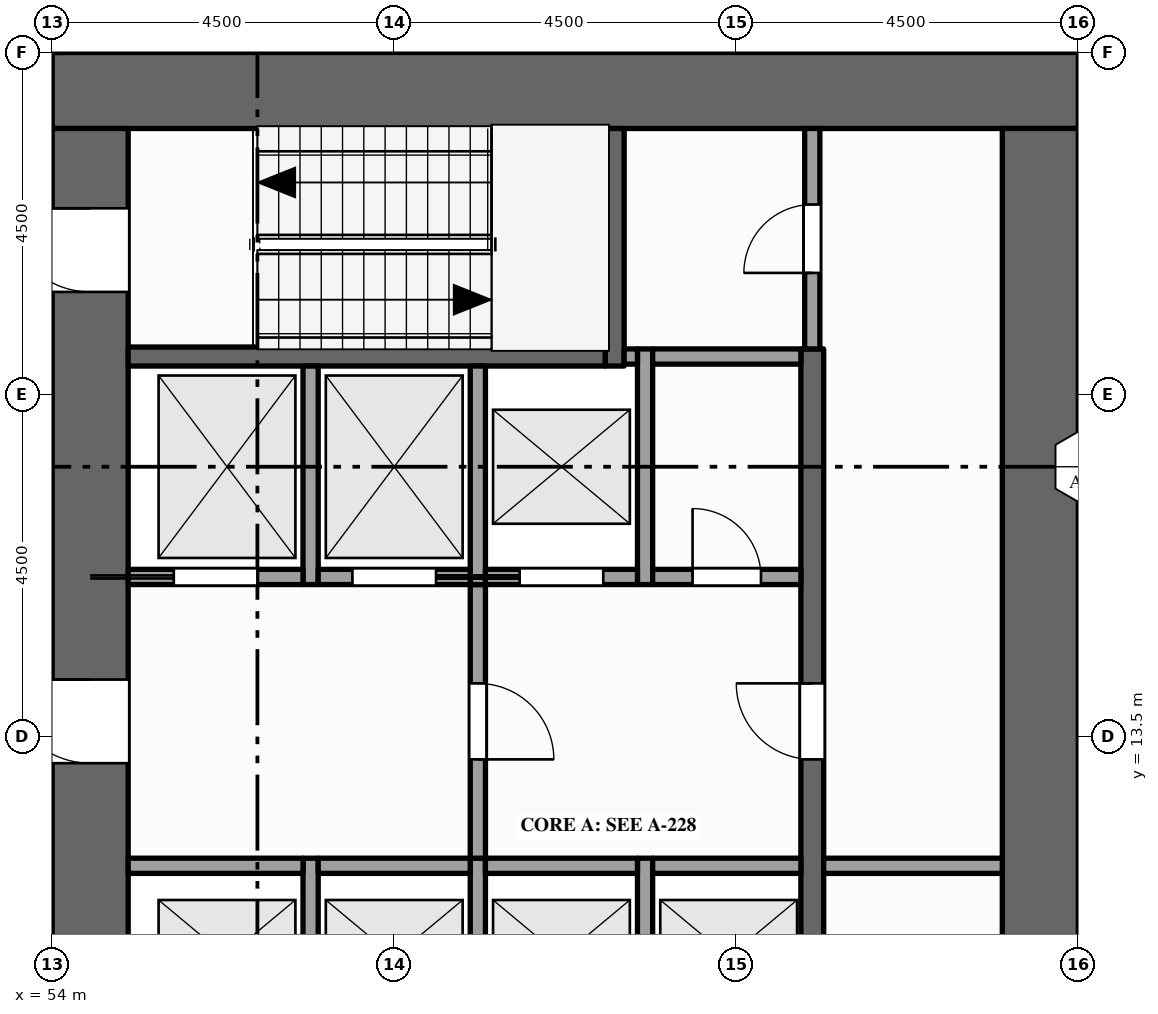
"""IFC4 building model, lengths in metres.
Left out: names, types, materials, properties, quantities, classifications, styles, units other than length and angle.
Written with IfcOpenShell. Run it as: python <this file> out.ifc"""

import sys

from ifc_helpers import new_model, si_unit, direction, frame, frame_2d, origin, place, context, subcontext, project, spatial, rectangle, extrude, element, fill, save


model = new_model("IFC4")
c1 = context("Model", 3, precision=1e-05, world=origin(), true_north=direction((0.0, 1.0)))
c2 = subcontext(c1, "Body", "Model", "MODEL_VIEW")
j1 = project(units=[si_unit("LENGTHUNIT", "METRE"), si_unit("PLANEANGLEUNIT", "RADIAN")], contexts=[c1])
p1 = place(None, origin())
s1 = spatial("IfcSite", under=j1, at=p1, CompositionType="ELEMENT")
p2 = place(p1, origin())
s2 = spatial("IfcBuilding", under=s1, at=p2, CompositionType="ELEMENT")
p3 = place(p2, frame((0.0, 0.0, 151.0)))
s3 = spatial("IfcBuildingStorey", under=s2, at=p3, CompositionType="ELEMENT", Elevation=151.0)
p4 = place(p3, frame((54.0, 22.0, -0.15), z_axis=(0.0, 0.0, 1.0), x_axis=(1.0, 0.0, 0.0)))
e1 = element("IfcWall", 1, at=p4, inside=s3, PredefinedType="SHEAR", context=c2, shape_type="SweptSolid", body=[
    extrude(rectangle(XDim=13.5, YDim=1.0, at=frame_2d((6.75, 0.0))), origin(), (0.0, 0.0, 1.0), 4.0),
])
p5 = place(p3, frame((54.5, 1.0, -0.15), z_axis=(0.0, 0.0, 1.0), x_axis=(0.0, 1.0, 0.0)))
e2 = element("IfcWall", 2, at=p5, inside=s3, PredefinedType="SHEAR", context=c2, shape_type="SweptSolid", body=[
    extrude(rectangle(XDim=20.5, YDim=1.0, at=frame_2d((10.25, 0.0))), origin(), (0.0, 0.0, 1.0), 4.0),
])
p6 = place(p5, frame((6.1, 0.0, 0.15)))
e3 = element("IfcOpeningElement", 3, at=p6, cuts=e2, PredefinedType="OPENING", context=c2, shape_type="SweptSolid", body=[
    extrude(rectangle(XDim=1.8, YDim=2.1, at=frame_2d((0.9, 1.05))), frame((0.0, 0.51, 0.0), z_axis=(0.0, -1.0, 0.0), x_axis=(1.0, 0.0, 0.0)), (0.0, 0.0, 1.0), 1.02),
])
p7 = place(p5, frame((12.15, 0.0, 0.15)))
e4 = element("IfcOpeningElement", 4, at=p7, cuts=e2, PredefinedType="OPENING", context=c2, shape_type="SweptSolid", body=[
    extrude(rectangle(XDim=1.1, YDim=2.1, at=frame_2d((0.55, 1.05))), frame((0.0, 0.51, 0.0), z_axis=(0.0, -1.0, 0.0), x_axis=(1.0, 0.0, 0.0)), (0.0, 0.0, 1.0), 1.02),
])
p8 = place(p5, frame((1.15, 0.0, 0.15)))
e5 = element("IfcOpeningElement", 5, at=p8, cuts=e2, PredefinedType="OPENING", context=c2, shape_type="SweptSolid", body=[
    extrude(rectangle(XDim=1.1, YDim=2.1, at=frame_2d((0.55, 1.05))), frame((0.0, 0.51, 0.0), z_axis=(0.0, -1.0, 0.0), x_axis=(1.0, 0.0, 0.0)), (0.0, 0.0, 1.0), 1.02),
])
p9 = place(p5, frame((18.35, 0.0, 0.15)))
e6 = element("IfcOpeningElement", 6, at=p9, cuts=e2, PredefinedType="OPENING", context=c2, shape_type="SweptSolid", body=[
    extrude(rectangle(XDim=1.1, YDim=2.1, at=frame_2d((0.55, 1.05))), frame((0.0, 0.51, 0.0), z_axis=(0.0, -1.0, 0.0), x_axis=(1.0, 0.0, 0.0)), (0.0, 0.0, 1.0), 1.02),
])
p10 = place(p3, frame((67.0, 1.0, -0.15), z_axis=(0.0, 0.0, 1.0), x_axis=(0.0, 1.0, 0.0)))
e7 = element("IfcWall", 7, at=p10, inside=s3, PredefinedType="SHEAR", context=c2, shape_type="SweptSolid", body=[
    extrude(rectangle(XDim=20.5, YDim=1.0, at=frame_2d((10.25, 0.0))), origin(), (0.0, 0.0, 1.0), 4.0),
])
p11 = place(p3, frame((54.0, 22.5, 0.0), z_axis=(0.0, 0.0, 1.0), x_axis=(0.0, 1.0, 0.0)))
e8 = element("IfcWall", 8, at=p11, inside=s3, PredefinedType="STANDARD", context=c2, shape_type="SweptSolid", body=[
    extrude(rectangle(XDim=1.05, YDim=0.3, at=frame_2d((0.525, 0.0))), origin(), (0.0, 0.0, 1.0), 3.149),
])
p12 = place(p3, frame((57.4, 9.3, 0.0), z_axis=(0.0, 0.0, 1.0), x_axis=(0.0, 1.0, 0.0)))
e9 = element("IfcWall", 9, at=p12, inside=s3, PredefinedType="SOLIDWALL", context=c2, shape_type="SweptSolid", body=[
    extrude(rectangle(XDim=2.6, YDim=0.2, at=frame_2d((1.3, 0.0))), origin(), (0.0, 0.0, 1.0), 3.85),
])
p13 = place(p3, frame((57.4, 15.5, 0.0), z_axis=(0.0, 0.0, 1.0), x_axis=(0.0, 1.0, 0.0)))
e10 = element("IfcWall", 10, at=p13, inside=s3, PredefinedType="SOLIDWALL", context=c2, shape_type="SweptSolid", body=[
    extrude(rectangle(XDim=2.875, YDim=0.2, at=frame_2d((1.438, 0.0))), origin(), (0.0, 0.0, 1.0), 3.85),
])
p14 = place(p3, frame((59.6, 9.3, 0.0), z_axis=(0.0, 0.0, 1.0), x_axis=(0.0, 1.0, 0.0)))
e11 = element("IfcWall", 11, at=p14, inside=s3, PredefinedType="SOLIDWALL", context=c2, shape_type="SweptSolid", body=[
    extrude(rectangle(XDim=2.6, YDim=0.2, at=frame_2d((1.3, 0.0))), origin(), (0.0, 0.0, 1.0), 3.85),
])
p15 = place(p3, frame((59.6, 11.9, 0.0), z_axis=(0.0, 0.0, 1.0), x_axis=(0.0, 1.0, 0.0)))
e12 = element("IfcWall", 12, at=p15, inside=s3, PredefinedType="PARTITIONING", context=c2, shape_type="SweptSolid", body=[
    extrude(rectangle(XDim=3.6, YDim=0.2, at=frame_2d((1.8, 0.0))), origin(), (0.0, 0.0, 1.0), 3.85),
])
p16 = place(p15, frame((1.3, 0.0, 0.0)))
e13 = element("IfcOpeningElement", 13, at=p16, cuts=e12, PredefinedType="OPENING", context=c2, shape_type="SweptSolid", body=[
    extrude(rectangle(XDim=1.0, YDim=2.1, at=frame_2d((0.5, 1.05))), frame((0.0, 0.11, 0.0), z_axis=(0.0, -1.0, 0.0), x_axis=(1.0, 0.0, 0.0)), (0.0, 0.0, 1.0), 0.22),
])
p17 = place(p3, frame((59.6, 15.5, 0.0), z_axis=(0.0, 0.0, 1.0), x_axis=(0.0, 1.0, 0.0)))
e14 = element("IfcWall", 14, at=p17, inside=s3, PredefinedType="SOLIDWALL", context=c2, shape_type="SweptSolid", body=[
    extrude(rectangle(XDim=2.875, YDim=0.2, at=frame_2d((1.438, 0.0))), origin(), (0.0, 0.0, 1.0), 3.85),
])
p18 = place(p3, frame((61.4, 18.375, 0.0), z_axis=(0.0, 0.0, 1.0), x_axis=(0.0, 1.0, 0.0)))
e15 = element("IfcWall", 15, at=p18, inside=s3, PredefinedType="SHEAR", context=c2, shape_type="SweptSolid", body=[
    extrude(rectangle(XDim=3.125, YDim=0.25, at=frame_2d((1.562, 0.0))), origin(), (0.0, 0.0, 1.0), 3.85),
])
p19 = place(p3, frame((61.8, 9.3, 0.0), z_axis=(0.0, 0.0, 1.0), x_axis=(0.0, 1.0, 0.0)))
e16 = element("IfcWall", 16, at=p19, inside=s3, PredefinedType="SOLIDWALL", context=c2, shape_type="SweptSolid", body=[
    extrude(rectangle(XDim=2.6, YDim=0.2, at=frame_2d((1.3, 0.0))), origin(), (0.0, 0.0, 1.0), 3.85),
])
p20 = place(p3, frame((61.8, 15.5, 0.0), z_axis=(0.0, 0.0, 1.0), x_axis=(0.0, 1.0, 0.0)))
e17 = element("IfcWall", 17, at=p20, inside=s3, PredefinedType="SOLIDWALL", context=c2, shape_type="SweptSolid", body=[
    extrude(rectangle(XDim=3.1, YDim=0.2, at=frame_2d((1.55, 0.0))), origin(), (0.0, 0.0, 1.0), 3.85),
])
p21 = place(p3, frame((64.0, 4.1, 0.0), z_axis=(0.0, 0.0, 1.0), x_axis=(0.0, 1.0, 0.0)))
e18 = element("IfcWall", 18, at=p21, inside=s3, PredefinedType="SHEAR", context=c2, shape_type="SweptSolid", body=[
    extrude(rectangle(XDim=14.5, YDim=0.3, at=frame_2d((7.25, 0.0))), origin(), (0.0, 0.0, 1.0), 3.85),
])
p22 = place(p21, frame((3.4, 0.0, 0.0)))
e19 = element("IfcOpeningElement", 19, at=p22, cuts=e18, PredefinedType="OPENING", context=c2, shape_type="SweptSolid", body=[
    extrude(rectangle(XDim=1.0, YDim=2.1, at=frame_2d((0.5, 1.05))), frame((0.0, 0.16, 0.0), z_axis=(0.0, -1.0, 0.0), x_axis=(1.0, 0.0, 0.0)), (0.0, 0.0, 1.0), 0.32),
])
p23 = place(p21, frame((9.1, 0.0, 0.0)))
e20 = element("IfcOpeningElement", 20, at=p23, cuts=e18, PredefinedType="OPENING", context=c2, shape_type="SweptSolid", body=[
    extrude(rectangle(XDim=1.0, YDim=2.1, at=frame_2d((0.5, 1.05))), frame((0.0, 0.16, 0.0), z_axis=(0.0, -1.0, 0.0), x_axis=(1.0, 0.0, 0.0)), (0.0, 0.0, 1.0), 0.32),
])
p24 = place(p3, frame((64.0, 18.6, 0.0), z_axis=(0.0, 0.0, 1.0), x_axis=(0.0, 1.0, 0.0)))
e21 = element("IfcWall", 21, at=p24, inside=s3, PredefinedType="PARTITIONING", context=c2, shape_type="SweptSolid", body=[
    extrude(rectangle(XDim=2.9, YDim=0.2, at=frame_2d((1.45, 0.0))), origin(), (0.0, 0.0, 1.0), 3.85),
])
p25 = place(p24, frame((1.0, 0.0, 0.0)))
e22 = element("IfcOpeningElement", 22, at=p25, cuts=e21, PredefinedType="OPENING", context=c2, shape_type="SweptSolid", body=[
    extrude(rectangle(XDim=0.9, YDim=2.1, at=frame_2d((0.45, 1.05))), frame((0.0, 0.11, 0.0), z_axis=(0.0, -1.0, 0.0), x_axis=(1.0, 0.0, 0.0)), (0.0, 0.0, 1.0), 0.22),
])
p26 = place(p3, frame((55.0, 11.8, 0.0), z_axis=(0.0, 0.0, 1.0), x_axis=(1.0, 0.0, 0.0)))
e23 = element("IfcWall", 23, at=p26, inside=s3, PredefinedType="SOLIDWALL", context=c2, shape_type="SweptSolid", body=[
    extrude(rectangle(XDim=2.3, YDim=0.2, at=frame_2d((1.15, 0.0))), origin(), (0.0, 0.0, 1.0), 3.85),
])
for number, where, z_axis, x_axis in (
    (24, (57.5, 11.8, 0.0), (0.0, 0.0, 1.0), (1.0, 0.0, 0.0)),
    (25, (59.7, 11.8, 0.0), (0.0, 0.0, 1.0), (1.0, 0.0, 0.0)),
):
    element("IfcWall", number, at=place(p3, frame(where, z_axis=z_axis, x_axis=x_axis)), inside=s3, PredefinedType="SOLIDWALL", context=c2, shape_type="SweptSolid", body=[
        extrude(rectangle(XDim=2.0, YDim=0.2, at=frame_2d((1.0, 0.0))), origin(), (0.0, 0.0, 1.0), 3.85),
    ])
p27 = place(p3, frame((61.9, 11.8, 0.0), z_axis=(0.0, 0.0, 1.0), x_axis=(1.0, 0.0, 0.0)))
e26 = element("IfcWall", 26, at=p27, inside=s3, PredefinedType="SOLIDWALL", context=c2, shape_type="SweptSolid", body=[
    extrude(rectangle(XDim=1.95, YDim=0.2, at=frame_2d((0.975, 0.0))), origin(), (0.0, 0.0, 1.0), 3.85),
])
p28 = place(p3, frame((64.15, 11.8, 0.0), z_axis=(0.0, 0.0, 1.0), x_axis=(1.0, 0.0, 0.0)))
e27 = element("IfcWall", 27, at=p28, inside=s3, PredefinedType="PARTITIONING", context=c2, shape_type="SweptSolid", body=[
    extrude(rectangle(XDim=2.35, YDim=0.2, at=frame_2d((1.175, 0.0))), origin(), (0.0, 0.0, 1.0), 3.85),
])
p29 = place(p3, frame((55.0, 15.6, 0.0), z_axis=(0.0, 0.0, 1.0), x_axis=(1.0, 0.0, 0.0)))
e28 = element("IfcWall", 28, at=p29, inside=s3, PredefinedType="SOLIDWALL", context=c2, shape_type="SweptSolid", body=[
    extrude(rectangle(XDim=2.3, YDim=0.2, at=frame_2d((1.15, 0.0))), origin(), (0.0, 0.0, 1.0), 3.85),
])
p30 = place(p29, frame((0.6, 0.0, 0.012)))
e29 = element("IfcOpeningElement", 29, at=p30, cuts=e28, PredefinedType="OPENING", context=c2, shape_type="SweptSolid", body=[
    extrude(rectangle(XDim=1.1, YDim=2.1, at=frame_2d((0.55, 1.05))), frame((0.0, 0.11, 0.0), z_axis=(0.0, -1.0, 0.0), x_axis=(1.0, 0.0, 0.0)), (0.0, 0.0, 1.0), 0.22),
])
p31 = place(p3, frame((57.5, 15.6, 0.0), z_axis=(0.0, 0.0, 1.0), x_axis=(1.0, 0.0, 0.0)))
e30 = element("IfcWall", 30, at=p31, inside=s3, PredefinedType="SOLIDWALL", context=c2, shape_type="SweptSolid", body=[
    extrude(rectangle(XDim=2.0, YDim=0.2, at=frame_2d((1.0, 0.0))), origin(), (0.0, 0.0, 1.0), 3.85),
])
p32 = place(p31, frame((0.45, 0.0, 0.012)))
e31 = element("IfcOpeningElement", 31, at=p32, cuts=e30, PredefinedType="OPENING", context=c2, shape_type="SweptSolid", body=[
    extrude(rectangle(XDim=1.1, YDim=2.1, at=frame_2d((0.55, 1.05))), frame((0.0, 0.11, 0.0), z_axis=(0.0, -1.0, 0.0), x_axis=(1.0, 0.0, 0.0)), (0.0, 0.0, 1.0), 0.22),
])
p33 = place(p3, frame((59.7, 15.6, 0.0), z_axis=(0.0, 0.0, 1.0), x_axis=(1.0, 0.0, 0.0)))
e32 = element("IfcWall", 32, at=p33, inside=s3, PredefinedType="SOLIDWALL", context=c2, shape_type="SweptSolid", body=[
    extrude(rectangle(XDim=2.0, YDim=0.2, at=frame_2d((1.0, 0.0))), origin(), (0.0, 0.0, 1.0), 3.85),
])
p34 = place(p33, frame((0.45, 0.0, 0.012)))
e33 = element("IfcOpeningElement", 33, at=p34, cuts=e32, PredefinedType="OPENING", context=c2, shape_type="SweptSolid", body=[
    extrude(rectangle(XDim=1.1, YDim=2.1, at=frame_2d((0.55, 1.05))), frame((0.0, 0.11, 0.0), z_axis=(0.0, -1.0, 0.0), x_axis=(1.0, 0.0, 0.0)), (0.0, 0.0, 1.0), 0.22),
])
p35 = place(p3, frame((61.9, 15.6, 0.0), z_axis=(0.0, 0.0, 1.0), x_axis=(1.0, 0.0, 0.0)))
e34 = element("IfcWall", 34, at=p35, inside=s3, PredefinedType="PARTITIONING", context=c2, shape_type="SweptSolid", body=[
    extrude(rectangle(XDim=1.95, YDim=0.2, at=frame_2d((0.975, 0.0))), origin(), (0.0, 0.0, 1.0), 3.85),
])
p36 = place(p35, frame((0.525, 0.0, 0.0)))
e35 = element("IfcOpeningElement", 35, at=p36, cuts=e34, PredefinedType="OPENING", context=c2, shape_type="SweptSolid", body=[
    extrude(rectangle(XDim=0.9, YDim=2.1, at=frame_2d((0.45, 1.05))), frame((0.0, 0.11, 0.0), z_axis=(0.0, -1.0, 0.0), x_axis=(1.0, 0.0, 0.0)), (0.0, 0.0, 1.0), 0.22),
])
p37 = place(p3, frame((55.0, 18.5, 0.0), z_axis=(0.0, 0.0, 1.0), x_axis=(1.0, 0.0, 0.0)))
e36 = element("IfcWall", 36, at=p37, inside=s3, PredefinedType="SHEAR", context=c2, shape_type="SweptSolid", body=[
    extrude(rectangle(XDim=6.275, YDim=0.25, at=frame_2d((3.137, 0.0))), origin(), (0.0, 0.0, 1.0), 3.85),
])
p38 = place(p3, frame((61.525, 18.5, 0.0), z_axis=(0.0, 0.0, 1.0), x_axis=(1.0, 0.0, 0.0)))
e37 = element("IfcWall", 37, at=p38, inside=s3, PredefinedType="SOLIDWALL", context=c2, shape_type="SweptSolid", body=[
    extrude(rectangle(XDim=0.175, YDim=0.2, at=frame_2d((0.087, 0.0))), origin(), (0.0, 0.0, 1.0), 3.85),
])
p39 = place(p3, frame((61.9, 18.5, 0.0), z_axis=(0.0, 0.0, 1.0), x_axis=(1.0, 0.0, 0.0)))
e38 = element("IfcWall", 38, at=p39, inside=s3, PredefinedType="PARTITIONING", context=c2, shape_type="SweptSolid", body=[
    extrude(rectangle(XDim=1.95, YDim=0.2, at=frame_2d((0.975, 0.0))), origin(), (0.0, 0.0, 1.0), 3.85),
])
p40 = place(p30, origin())
e39 = element("IfcDoor", 39, at=p40, inside=s3, OperationType="SLIDING_TO_LEFT", PredefinedType="DOOR", context=c2, shape_type="SweptSolid", body=[
    extrude(rectangle(XDim=1.1, YDim=2.1, at=frame_2d((0.55, 1.05))), frame((0.0, 0.025, 0.0), z_axis=(0.0, -1.0, 0.0), x_axis=(1.0, 0.0, 0.0)), (0.0, 0.0, 1.0), 0.05),
])
fill(e29, e39)
p41 = place(p32, origin())
e40 = element("IfcDoor", 40, at=p41, inside=s3, OperationType="SLIDING_TO_RIGHT", PredefinedType="DOOR", context=c2, shape_type="SweptSolid", body=[
    extrude(rectangle(XDim=1.1, YDim=2.1, at=frame_2d((0.55, 1.05))), frame((0.0, 0.025, 0.0), z_axis=(0.0, -1.0, 0.0), x_axis=(1.0, 0.0, 0.0)), (0.0, 0.0, 1.0), 0.05),
])
fill(e31, e40)
p42 = place(p34, origin())
e41 = element("IfcDoor", 41, at=p42, inside=s3, OperationType="SLIDING_TO_LEFT", PredefinedType="DOOR", context=c2, shape_type="SweptSolid", body=[
    extrude(rectangle(XDim=1.1, YDim=2.1, at=frame_2d((0.55, 1.05))), frame((0.0, 0.025, 0.0), z_axis=(0.0, -1.0, 0.0), x_axis=(1.0, 0.0, 0.0)), (0.0, 0.0, 1.0), 0.05),
])
fill(e33, e41)
p43 = place(p7, origin())
e42 = element("IfcDoor", 42, at=p43, inside=s3, OperationType="SINGLE_SWING_RIGHT", PredefinedType="DOOR", context=c2, shape_type="SweptSolid", body=[
    extrude(rectangle(XDim=1.1, YDim=2.1, at=frame_2d((0.55, 1.05))), frame((0.0, 0.025, 0.0), z_axis=(0.0, -1.0, 0.0), x_axis=(1.0, 0.0, 0.0)), (0.0, 0.0, 1.0), 0.05),
])
fill(e4, e42)
p44 = place(p16, origin())
e43 = element("IfcDoor", 43, at=p44, inside=s3, OperationType="SINGLE_SWING_LEFT", PredefinedType="DOOR", context=c2, shape_type="SweptSolid", body=[
    extrude(rectangle(XDim=1.0, YDim=2.1, at=frame_2d((0.5, 1.05))), frame((0.0, 0.025, 0.0), z_axis=(0.0, -1.0, 0.0), x_axis=(1.0, 0.0, 0.0)), (0.0, 0.0, 1.0), 0.05),
])
fill(e13, e43)
p45 = place(p23, origin())
e44 = element("IfcDoor", 44, at=p45, inside=s3, OperationType="SINGLE_SWING_RIGHT", PredefinedType="DOOR", context=c2, shape_type="SweptSolid", body=[
    extrude(rectangle(XDim=1.0, YDim=2.1, at=frame_2d((0.5, 1.05))), frame((0.0, 0.025, 0.0), z_axis=(0.0, -1.0, 0.0), x_axis=(1.0, 0.0, 0.0)), (0.0, 0.0, 1.0), 0.05),
])
fill(e20, e44)
p46 = place(p9, origin())
e45 = element("IfcDoor", 45, at=p46, inside=s3, OperationType="SINGLE_SWING_RIGHT", PredefinedType="DOOR", context=c2, shape_type="SweptSolid", body=[
    extrude(rectangle(XDim=1.1, YDim=2.1, at=frame_2d((0.55, 1.05))), frame((0.0, 0.025, 0.0), z_axis=(0.0, -1.0, 0.0), x_axis=(1.0, 0.0, 0.0)), (0.0, 0.0, 1.0), 0.05),
])
fill(e6, e45)
p47 = place(p25, origin())
e46 = element("IfcDoor", 46, at=p47, inside=s3, OperationType="SINGLE_SWING_LEFT", PredefinedType="DOOR", context=c2, shape_type="SweptSolid", body=[
    extrude(rectangle(XDim=0.9, YDim=2.1, at=frame_2d((0.45, 1.05))), frame((0.0, 0.025, 0.0), z_axis=(0.0, -1.0, 0.0), x_axis=(1.0, 0.0, 0.0)), (0.0, 0.0, 1.0), 0.05),
])
fill(e22, e46)
p48 = place(p36, origin())
e47 = element("IfcDoor", 47, at=p48, inside=s3, OperationType="SINGLE_SWING_LEFT", PredefinedType="DOOR", context=c2, shape_type="SweptSolid", body=[
    extrude(rectangle(XDim=0.9, YDim=2.1, at=frame_2d((0.45, 1.05))), frame((0.0, 0.025, 0.0), z_axis=(0.0, -1.0, 0.0), x_axis=(1.0, 0.0, 0.0)), (0.0, 0.0, 1.0), 0.05),
])
fill(e35, e47)
save(model, sys.argv[1])
